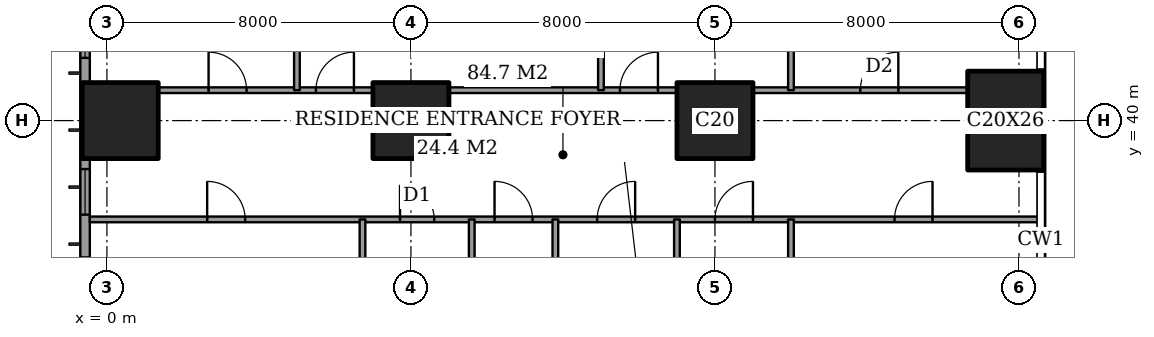
"""IFC4 building model, lengths in metres.
Left out: names, types, materials, properties, quantities, classifications, styles, units other than length and angle.
Written with IfcOpenShell. Run it as: python <this file> out.ifc"""

import sys

from ifc_helpers import new_model, si_unit, direction, frame, frame_2d, origin, origin_2d, place, context, subcontext, project, spatial, rectangle, extrude, element, fill, save


model = new_model("IFC4")
c1 = context("Model", 3, precision=1e-05, world=origin(), true_north=direction((0.0, 1.0)))
c2 = subcontext(c1, "Body", "Model", "MODEL_VIEW")
j1 = project(units=[si_unit("LENGTHUNIT", "METRE"), si_unit("PLANEANGLEUNIT", "RADIAN")], contexts=[c1])
p1 = place(None, origin())
s1 = spatial("IfcSite", under=j1, at=p1, CompositionType="ELEMENT")
p2 = place(p1, origin())
s2 = spatial("IfcBuilding", under=s1, at=p2, CompositionType="ELEMENT")
p3 = place(p2, frame((0.0, 0.0, 40.4)))
s3 = spatial("IfcBuildingStorey", under=s2, at=p3, CompositionType="ELEMENT", Elevation=40.4)
for number, where, z_axis, x_axis in (
    (1, (0.35, 40.0, 0.0), (0.0, 0.0, 1.0), (1.0, 0.0, 0.0)),
    (2, (8.0, 40.0, 0.0), (0.0, 0.0, 1.0), (1.0, 0.0, 0.0)),
    (3, (16.0, 40.0, 0.0), (0.0, 0.0, 1.0), (1.0, 0.0, 0.0)),
):
    element("IfcColumn", number, at=place(p3, frame(where, z_axis=z_axis, x_axis=x_axis)), inside=s3, PredefinedType="COLUMN", context=c2, shape_type="SweptSolid", body=[
        extrude(rectangle(XDim=2.0, YDim=2.0, at=origin_2d()), origin(), (0.0, 0.0, 1.0), 3.6),
    ])
p4 = place(p3, frame((23.65, 40.0, 0.0), z_axis=(0.0, 0.0, 1.0), x_axis=(1.0, 0.0, 0.0)))
e4 = element("IfcColumn", 4, at=p4, inside=s3, PredefinedType="COLUMN", context=c2, shape_type="SweptSolid", body=[
    extrude(rectangle(XDim=2.0, YDim=2.6, at=origin_2d()), origin(), (0.0, 0.0, 1.0), 3.6),
])
p5 = place(p3, frame((-0.575, 44.825, 0.0), z_axis=(0.0, 0.0, 1.0), x_axis=(0.0, -1.0, 0.0)))
e5 = element("IfcWall", 5, at=p5, inside=s3, PredefinedType="SOLIDWALL", context=c2, shape_type="SweptSolid", body=[
    extrude(rectangle(XDim=41.65, YDim=0.25, at=frame_2d((20.825, 0.0))), origin(), (0.0, 0.0, 1.0), 3.6),
])
p6 = place(p5, frame((0.775, 0.0, 0.6)))
e6 = element("IfcOpeningElement", 6, at=p6, cuts=e5, PredefinedType="OPENING", context=c2, shape_type="SweptSolid", body=[
    extrude(rectangle(XDim=2.4, YDim=2.0, at=frame_2d((1.2, 1.0))), frame((0.0, 0.135, 0.0), z_axis=(0.0, -1.0, 0.0), x_axis=(1.0, 0.0, 0.0)), (0.0, 0.0, 1.0), 0.27),
])
p7 = place(p5, frame((6.1, 0.0, 0.6)))
e7 = element("IfcOpeningElement", 7, at=p7, cuts=e5, PredefinedType="OPENING", context=c2, shape_type="SweptSolid", body=[
    extrude(rectangle(XDim=1.2, YDim=2.0, at=frame_2d((0.6, 1.0))), frame((0.0, 0.135, 0.0), z_axis=(0.0, -1.0, 0.0), x_axis=(1.0, 0.0, 0.0)), (0.0, 0.0, 1.0), 0.27),
])
p8 = place(p5, frame((8.425, 0.0, 0.6)))
e8 = element("IfcOpeningElement", 8, at=p8, cuts=e5, PredefinedType="OPENING", context=c2, shape_type="SweptSolid", body=[
    extrude(rectangle(XDim=2.4, YDim=2.0, at=frame_2d((1.2, 1.0))), frame((0.0, 0.135, 0.0), z_axis=(0.0, -1.0, 0.0), x_axis=(1.0, 0.0, 0.0)), (0.0, 0.0, 1.0), 0.27),
])
p9 = place(p5, frame((15.625, 0.0, 0.6)))
e9 = element("IfcOpeningElement", 9, at=p9, cuts=e5, PredefinedType="OPENING", context=c2, shape_type="SweptSolid", body=[
    extrude(rectangle(XDim=2.4, YDim=2.0, at=frame_2d((1.2, 1.0))), frame((0.0, 0.135, 0.0), z_axis=(0.0, -1.0, 0.0), x_axis=(1.0, 0.0, 0.0)), (0.0, 0.0, 1.0), 0.27),
])
p10 = place(p5, frame((23.625, 0.0, 0.6)))
e10 = element("IfcOpeningElement", 10, at=p10, cuts=e5, PredefinedType="OPENING", context=c2, shape_type="SweptSolid", body=[
    extrude(rectangle(XDim=2.4, YDim=2.0, at=frame_2d((1.2, 1.0))), frame((0.0, 0.135, 0.0), z_axis=(0.0, -1.0, 0.0), x_axis=(1.0, 0.0, 0.0)), (0.0, 0.0, 1.0), 0.27),
])
p11 = place(p5, frame((30.825, 0.0, 0.6)))
e11 = element("IfcOpeningElement", 11, at=p11, cuts=e5, PredefinedType="OPENING", context=c2, shape_type="SweptSolid", body=[
    extrude(rectangle(XDim=2.4, YDim=2.0, at=frame_2d((1.2, 1.0))), frame((0.0, 0.135, 0.0), z_axis=(0.0, -1.0, 0.0), x_axis=(1.0, 0.0, 0.0)), (0.0, 0.0, 1.0), 0.27),
])
p12 = place(p5, frame((34.5, 0.0, 0.6)))
e12 = element("IfcOpeningElement", 12, at=p12, cuts=e5, PredefinedType="OPENING", context=c2, shape_type="SweptSolid", body=[
    extrude(rectangle(XDim=1.2, YDim=2.0, at=frame_2d((0.6, 1.0))), frame((0.0, 0.135, 0.0), z_axis=(0.0, -1.0, 0.0), x_axis=(1.0, 0.0, 0.0)), (0.0, 0.0, 1.0), 0.27),
])
p13 = place(p5, frame((38.475, 0.0, 0.6)))
e13 = element("IfcOpeningElement", 13, at=p13, cuts=e5, PredefinedType="OPENING", context=c2, shape_type="SweptSolid", body=[
    extrude(rectangle(XDim=2.4, YDim=2.0, at=frame_2d((1.2, 1.0))), frame((0.0, 0.135, 0.0), z_axis=(0.0, -1.0, 0.0), x_axis=(1.0, 0.0, 0.0)), (0.0, 0.0, 1.0), 0.27),
])
p14 = place(p3, frame((-0.45, 37.4, 0.0), z_axis=(0.0, 0.0, 1.0), x_axis=(1.0, 0.0, 0.0)))
e14 = element("IfcWall", 14, at=p14, inside=s3, PredefinedType="PARTITIONING", context=c2, shape_type="SweptSolid", body=[
    extrude(rectangle(XDim=25.011, YDim=0.15, at=frame_2d((12.505, 0.0))), origin(), (0.0, 0.0, 1.0), 3.35),
])
p15 = place(p14, frame((10.65, 0.0, 0.0)))
e15 = element("IfcOpeningElement", 15, at=p15, cuts=e14, PredefinedType="OPENING", context=c2, shape_type="SweptSolid", body=[
    extrude(rectangle(XDim=1.0, YDim=2.1, at=frame_2d((0.5, 1.05))), frame((0.0, 0.085, 0.0), z_axis=(0.0, -1.0, 0.0), x_axis=(1.0, 0.0, 0.0)), (0.0, 0.0, 1.0), 0.17),
])
p16 = place(p14, frame((3.087, 0.0, 0.0)))
e16 = element("IfcOpeningElement", 16, at=p16, cuts=e14, PredefinedType="OPENING", context=c2, shape_type="SweptSolid", body=[
    extrude(rectangle(XDim=1.0, YDim=2.1, at=frame_2d((0.5, 1.05))), frame((0.0, 0.085, 0.0), z_axis=(0.0, -1.0, 0.0), x_axis=(1.0, 0.0, 0.0)), (0.0, 0.0, 1.0), 0.17),
])
p17 = place(p14, frame((8.163, 0.0, 0.0)))
e17 = element("IfcOpeningElement", 17, at=p17, cuts=e14, PredefinedType="OPENING", context=c2, shape_type="SweptSolid", body=[
    extrude(rectangle(XDim=0.9, YDim=2.1, at=frame_2d((0.45, 1.05))), frame((0.0, 0.085, 0.0), z_axis=(0.0, -1.0, 0.0), x_axis=(1.0, 0.0, 0.0)), (0.0, 0.0, 1.0), 0.17),
])
p18 = place(p14, frame((13.35, 0.0, 0.0)))
e18 = element("IfcOpeningElement", 18, at=p18, cuts=e14, PredefinedType="OPENING", context=c2, shape_type="SweptSolid", body=[
    extrude(rectangle(XDim=1.0, YDim=2.1, at=frame_2d((0.5, 1.05))), frame((0.0, 0.085, 0.0), z_axis=(0.0, -1.0, 0.0), x_axis=(1.0, 0.0, 0.0)), (0.0, 0.0, 1.0), 0.17),
])
p19 = place(p14, frame((16.45, 0.0, 0.0)))
e19 = element("IfcOpeningElement", 19, at=p19, cuts=e14, PredefinedType="OPENING", context=c2, shape_type="SweptSolid", body=[
    extrude(rectangle(XDim=1.0, YDim=2.1, at=frame_2d((0.5, 1.05))), frame((0.0, 0.085, 0.0), z_axis=(0.0, -1.0, 0.0), x_axis=(1.0, 0.0, 0.0)), (0.0, 0.0, 1.0), 0.17),
])
p20 = place(p14, frame((21.175, 0.0, 0.0)))
e20 = element("IfcOpeningElement", 20, at=p20, cuts=e14, PredefinedType="OPENING", context=c2, shape_type="SweptSolid", body=[
    extrude(rectangle(XDim=1.0, YDim=2.1, at=frame_2d((0.5, 1.05))), frame((0.0, 0.085, 0.0), z_axis=(0.0, -1.0, 0.0), x_axis=(1.0, 0.0, 0.0)), (0.0, 0.0, 1.0), 0.17),
])
p21 = place(p3, frame((1.35, 40.8, 0.0), z_axis=(0.0, 0.0, 1.0), x_axis=(1.0, 0.0, 0.0)))
e21 = element("IfcWall", 21, at=p21, inside=s3, PredefinedType="PARTITIONING", context=c2, shape_type="SweptSolid", body=[
    extrude(rectangle(XDim=5.65, YDim=0.15, at=frame_2d((2.825, 0.0))), origin(), (0.0, 0.0, 1.0), 3.35),
])
p22 = place(p21, frame((1.325, 0.0, 0.0)))
e22 = element("IfcOpeningElement", 22, at=p22, cuts=e21, PredefinedType="OPENING", context=c2, shape_type="SweptSolid", body=[
    extrude(rectangle(XDim=1.0, YDim=2.1, at=frame_2d((0.5, 1.05))), frame((0.0, 0.085, 0.0), z_axis=(0.0, -1.0, 0.0), x_axis=(1.0, 0.0, 0.0)), (0.0, 0.0, 1.0), 0.17),
])
p23 = place(p21, frame((4.15, 0.0, 0.0)))
e23 = element("IfcOpeningElement", 23, at=p23, cuts=e21, PredefinedType="OPENING", context=c2, shape_type="SweptSolid", body=[
    extrude(rectangle(XDim=1.0, YDim=2.1, at=frame_2d((0.5, 1.05))), frame((0.0, 0.085, 0.0), z_axis=(0.0, -1.0, 0.0), x_axis=(1.0, 0.0, 0.0)), (0.0, 0.0, 1.0), 0.17),
])
p24 = place(p3, frame((9.0, 40.8, 0.0), z_axis=(0.0, 0.0, 1.0), x_axis=(1.0, 0.0, 0.0)))
e24 = element("IfcWall", 24, at=p24, inside=s3, PredefinedType="PARTITIONING", context=c2, shape_type="SweptSolid", body=[
    extrude(rectangle(XDim=6.0, YDim=0.15, at=frame_2d((3.0, 0.0))), origin(), (0.0, 0.0, 1.0), 3.35),
])
p25 = place(p24, frame((4.5, 0.0, 0.0)))
e25 = element("IfcOpeningElement", 25, at=p25, cuts=e24, PredefinedType="OPENING", context=c2, shape_type="SweptSolid", body=[
    extrude(rectangle(XDim=1.0, YDim=2.1, at=frame_2d((0.5, 1.05))), frame((0.0, 0.085, 0.0), z_axis=(0.0, -1.0, 0.0), x_axis=(1.0, 0.0, 0.0)), (0.0, 0.0, 1.0), 0.17),
])
p26 = place(p3, frame((17.0, 40.8, 0.0), z_axis=(0.0, 0.0, 1.0), x_axis=(1.0, 0.0, 0.0)))
e26 = element("IfcWall", 26, at=p26, inside=s3, PredefinedType="PARTITIONING", context=c2, shape_type="SweptSolid", body=[
    extrude(rectangle(XDim=5.65, YDim=0.15, at=frame_2d((2.825, 0.0))), origin(), (0.0, 0.0, 1.0), 3.35),
])
p27 = place(p26, frame((2.825, 0.0, 0.0)))
e27 = element("IfcOpeningElement", 27, at=p27, cuts=e26, PredefinedType="OPENING", context=c2, shape_type="SweptSolid", body=[
    extrude(rectangle(XDim=1.0, YDim=2.1, at=frame_2d((0.5, 1.05))), frame((0.0, 0.085, 0.0), z_axis=(0.0, -1.0, 0.0), x_axis=(1.0, 0.0, 0.0)), (0.0, 0.0, 1.0), 0.17),
])
p28 = place(p3, frame((5.0, 40.8, 0.0), z_axis=(0.0, 0.0, 1.0), x_axis=(0.0, 1.0, 0.0)))
e28 = element("IfcWall", 28, at=p28, inside=s3, PredefinedType="PARTITIONING", context=c2, shape_type="SweptSolid", body=[
    extrude(rectangle(XDim=7.65, YDim=0.15, at=frame_2d((3.825, 0.0))), origin(), (0.0, 0.0, 1.0), 3.35),
])
p29 = place(p3, frame((6.725, 33.2, 0.0), z_axis=(0.0, 0.0, 1.0), x_axis=(0.0, 1.0, 0.0)))
e29 = element("IfcWall", 29, at=p29, inside=s3, PredefinedType="PARTITIONING", context=c2, shape_type="SweptSolid", body=[
    extrude(rectangle(XDim=4.2, YDim=0.15, at=frame_2d((2.1, 0.0))), origin(), (0.0, 0.0, 1.0), 3.35),
])
p30 = place(p3, frame((9.6, 28.0, 0.0), z_axis=(0.0, 0.0, 1.0), x_axis=(0.0, 1.0, 0.0)))
e30 = element("IfcWall", 30, at=p30, inside=s3, PredefinedType="PARTITIONING", context=c2, shape_type="SweptSolid", body=[
    extrude(rectangle(XDim=9.4, YDim=0.15, at=frame_2d((4.7, 0.0))), origin(), (0.0, 0.0, 1.0), 3.35),
])
p31 = place(p30, frame((0.5, 0.0, 0.0)))
e31 = element("IfcOpeningElement", 31, at=p31, cuts=e30, PredefinedType="OPENING", context=c2, shape_type="SweptSolid", body=[
    extrude(rectangle(XDim=1.0, YDim=2.1, at=frame_2d((0.5, 1.05))), frame((0.0, 0.085, 0.0), z_axis=(0.0, -1.0, 0.0), x_axis=(1.0, 0.0, 0.0)), (0.0, 0.0, 1.0), 0.17),
])
p32 = place(p3, frame((11.8, 30.0, 0.0), z_axis=(0.0, 0.0, 1.0), x_axis=(0.0, 1.0, 0.0)))
e32 = element("IfcWall", 32, at=p32, inside=s3, PredefinedType="PARTITIONING", context=c2, shape_type="SweptSolid", body=[
    extrude(rectangle(XDim=7.4, YDim=0.15, at=frame_2d((3.7, 0.0))), origin(), (0.0, 0.0, 1.0), 3.35),
])
p33 = place(p3, frame((13.0, 40.8, 0.0), z_axis=(0.0, 0.0, 1.0), x_axis=(0.0, 1.0, 0.0)))
e33 = element("IfcWall", 33, at=p33, inside=s3, PredefinedType="PARTITIONING", context=c2, shape_type="SweptSolid", body=[
    extrude(rectangle(XDim=7.65, YDim=0.15, at=frame_2d((3.825, 0.0))), origin(), (0.0, 0.0, 1.0), 3.35),
])
p34 = place(p3, frame((15.0, 33.2, 0.0), z_axis=(0.0, 0.0, 1.0), x_axis=(0.0, 1.0, 0.0)))
e34 = element("IfcWall", 34, at=p34, inside=s3, PredefinedType="PARTITIONING", context=c2, shape_type="SweptSolid", body=[
    extrude(rectangle(XDim=4.2, YDim=0.15, at=frame_2d((2.1, 0.0))), origin(), (0.0, 0.0, 1.0), 3.35),
])
p35 = place(p3, frame((18.0, 31.1, 0.0), z_axis=(0.0, 0.0, 1.0), x_axis=(0.0, 1.0, 0.0)))
e35 = element("IfcWall", 35, at=p35, inside=s3, PredefinedType="PARTITIONING", context=c2, shape_type="SweptSolid", body=[
    extrude(rectangle(XDim=6.3, YDim=0.15, at=frame_2d((3.15, 0.0))), origin(), (0.0, 0.0, 1.0), 3.35),
])
p36 = place(p3, frame((18.0, 40.8, 0.0), z_axis=(0.0, 0.0, 1.0), x_axis=(0.0, 1.0, 0.0)))
e36 = element("IfcWall", 36, at=p36, inside=s3, PredefinedType="PARTITIONING", context=c2, shape_type="SweptSolid", body=[
    extrude(rectangle(XDim=7.65, YDim=0.15, at=frame_2d((3.825, 0.0))), origin(), (0.0, 0.0, 1.0), 3.35),
])
p37 = place(p6, origin())
e37 = element("IfcWindow", 37, at=p37, inside=s3, PartitioningType="SINGLE_PANEL", PredefinedType="WINDOW", context=c2, shape_type="SweptSolid", body=[
    extrude(rectangle(XDim=2.4, YDim=2.0, at=frame_2d((1.2, 1.0))), frame((0.0, 0.03, 0.0), z_axis=(0.0, -1.0, 0.0), x_axis=(1.0, 0.0, 0.0)), (0.0, 0.0, 1.0), 0.06),
])
fill(e6, e37)
p38 = place(p7, origin())
e38 = element("IfcWindow", 38, at=p38, inside=s3, PartitioningType="SINGLE_PANEL", PredefinedType="WINDOW", context=c2, shape_type="SweptSolid", body=[
    extrude(rectangle(XDim=1.2, YDim=2.0, at=frame_2d((0.6, 1.0))), frame((0.0, 0.03, 0.0), z_axis=(0.0, -1.0, 0.0), x_axis=(1.0, 0.0, 0.0)), (0.0, 0.0, 1.0), 0.06),
])
fill(e7, e38)
p39 = place(p22, origin())
e39 = element("IfcDoor", 39, at=p39, inside=s3, OperationType="SINGLE_SWING_RIGHT", PredefinedType="DOOR", context=c2, shape_type="SweptSolid", body=[
    extrude(rectangle(XDim=1.0, YDim=2.1, at=frame_2d((0.5, 1.05))), frame((0.0, 0.025, 0.0), z_axis=(0.0, -1.0, 0.0), x_axis=(1.0, 0.0, 0.0)), (0.0, 0.0, 1.0), 0.05),
])
fill(e22, e39)
p40 = place(p23, origin())
e40 = element("IfcDoor", 40, at=p40, inside=s3, OperationType="SINGLE_SWING_LEFT", PredefinedType="DOOR", context=c2, shape_type="SweptSolid", body=[
    extrude(rectangle(XDim=1.0, YDim=2.1, at=frame_2d((0.5, 1.05))), frame((0.0, 0.025, 0.0), z_axis=(0.0, -1.0, 0.0), x_axis=(1.0, 0.0, 0.0)), (0.0, 0.0, 1.0), 0.05),
])
fill(e23, e40)
p41 = place(p25, origin())
e41 = element("IfcDoor", 41, at=p41, inside=s3, OperationType="SINGLE_SWING_LEFT", PredefinedType="DOOR", context=c2, shape_type="SweptSolid", body=[
    extrude(rectangle(XDim=1.0, YDim=2.1, at=frame_2d((0.5, 1.05))), frame((0.0, 0.025, 0.0), z_axis=(0.0, -1.0, 0.0), x_axis=(1.0, 0.0, 0.0)), (0.0, 0.0, 1.0), 0.05),
])
fill(e25, e41)
p42 = place(p27, origin())
e42 = element("IfcDoor", 42, at=p42, inside=s3, OperationType="SINGLE_SWING_LEFT", PredefinedType="DOOR", context=c2, shape_type="SweptSolid", body=[
    extrude(rectangle(XDim=1.0, YDim=2.1, at=frame_2d((0.5, 1.05))), frame((0.0, 0.025, 0.0), z_axis=(0.0, -1.0, 0.0), x_axis=(1.0, 0.0, 0.0)), (0.0, 0.0, 1.0), 0.05),
])
fill(e27, e42)
p43 = place(p15, origin())
e43 = element("IfcDoor", 43, at=p43, inside=s3, OperationType="SINGLE_SWING_RIGHT", PredefinedType="DOOR", context=c2, shape_type="SweptSolid", body=[
    extrude(rectangle(XDim=1.0, YDim=2.1, at=frame_2d((0.5, 1.05))), frame((0.0, 0.025, 0.0), z_axis=(0.0, -1.0, 0.0), x_axis=(1.0, 0.0, 0.0)), (0.0, 0.0, 1.0), 0.05),
])
fill(e15, e43)
p44 = place(p16, origin())
e44 = element("IfcDoor", 44, at=p44, inside=s3, OperationType="SINGLE_SWING_RIGHT", PredefinedType="DOOR", context=c2, shape_type="SweptSolid", body=[
    extrude(rectangle(XDim=1.0, YDim=2.1, at=frame_2d((0.5, 1.05))), frame((0.0, 0.025, 0.0), z_axis=(0.0, -1.0, 0.0), x_axis=(1.0, 0.0, 0.0)), (0.0, 0.0, 1.0), 0.05),
])
fill(e16, e44)
p45 = place(p17, origin())
e45 = element("IfcDoor", 45, at=p45, inside=s3, OperationType="SINGLE_SWING_RIGHT", PredefinedType="DOOR", context=c2, shape_type="SweptSolid", body=[
    extrude(rectangle(XDim=0.9, YDim=2.1, at=frame_2d((0.45, 1.05))), frame((0.0, 0.025, 0.0), z_axis=(0.0, -1.0, 0.0), x_axis=(1.0, 0.0, 0.0)), (0.0, 0.0, 1.0), 0.05),
])
fill(e17, e45)
p46 = place(p18, origin())
e46 = element("IfcDoor", 46, at=p46, inside=s3, OperationType="SINGLE_SWING_LEFT", PredefinedType="DOOR", context=c2, shape_type="SweptSolid", body=[
    extrude(rectangle(XDim=1.0, YDim=2.1, at=frame_2d((0.5, 1.05))), frame((0.0, 0.025, 0.0), z_axis=(0.0, -1.0, 0.0), x_axis=(1.0, 0.0, 0.0)), (0.0, 0.0, 1.0), 0.05),
])
fill(e18, e46)
p47 = place(p19, origin())
e47 = element("IfcDoor", 47, at=p47, inside=s3, OperationType="SINGLE_SWING_LEFT", PredefinedType="DOOR", context=c2, shape_type="SweptSolid", body=[
    extrude(rectangle(XDim=1.0, YDim=2.1, at=frame_2d((0.5, 1.05))), frame((0.0, 0.025, 0.0), z_axis=(0.0, -1.0, 0.0), x_axis=(1.0, 0.0, 0.0)), (0.0, 0.0, 1.0), 0.05),
])
fill(e19, e47)
p48 = place(p20, origin())
e48 = element("IfcDoor", 48, at=p48, inside=s3, OperationType="SINGLE_SWING_LEFT", PredefinedType="DOOR", context=c2, shape_type="SweptSolid", body=[
    extrude(rectangle(XDim=1.0, YDim=2.1, at=frame_2d((0.5, 1.05))), frame((0.0, 0.025, 0.0), z_axis=(0.0, -1.0, 0.0), x_axis=(1.0, 0.0, 0.0)), (0.0, 0.0, 1.0), 0.05),
])
fill(e20, e48)
save(model, sys.argv[1])
